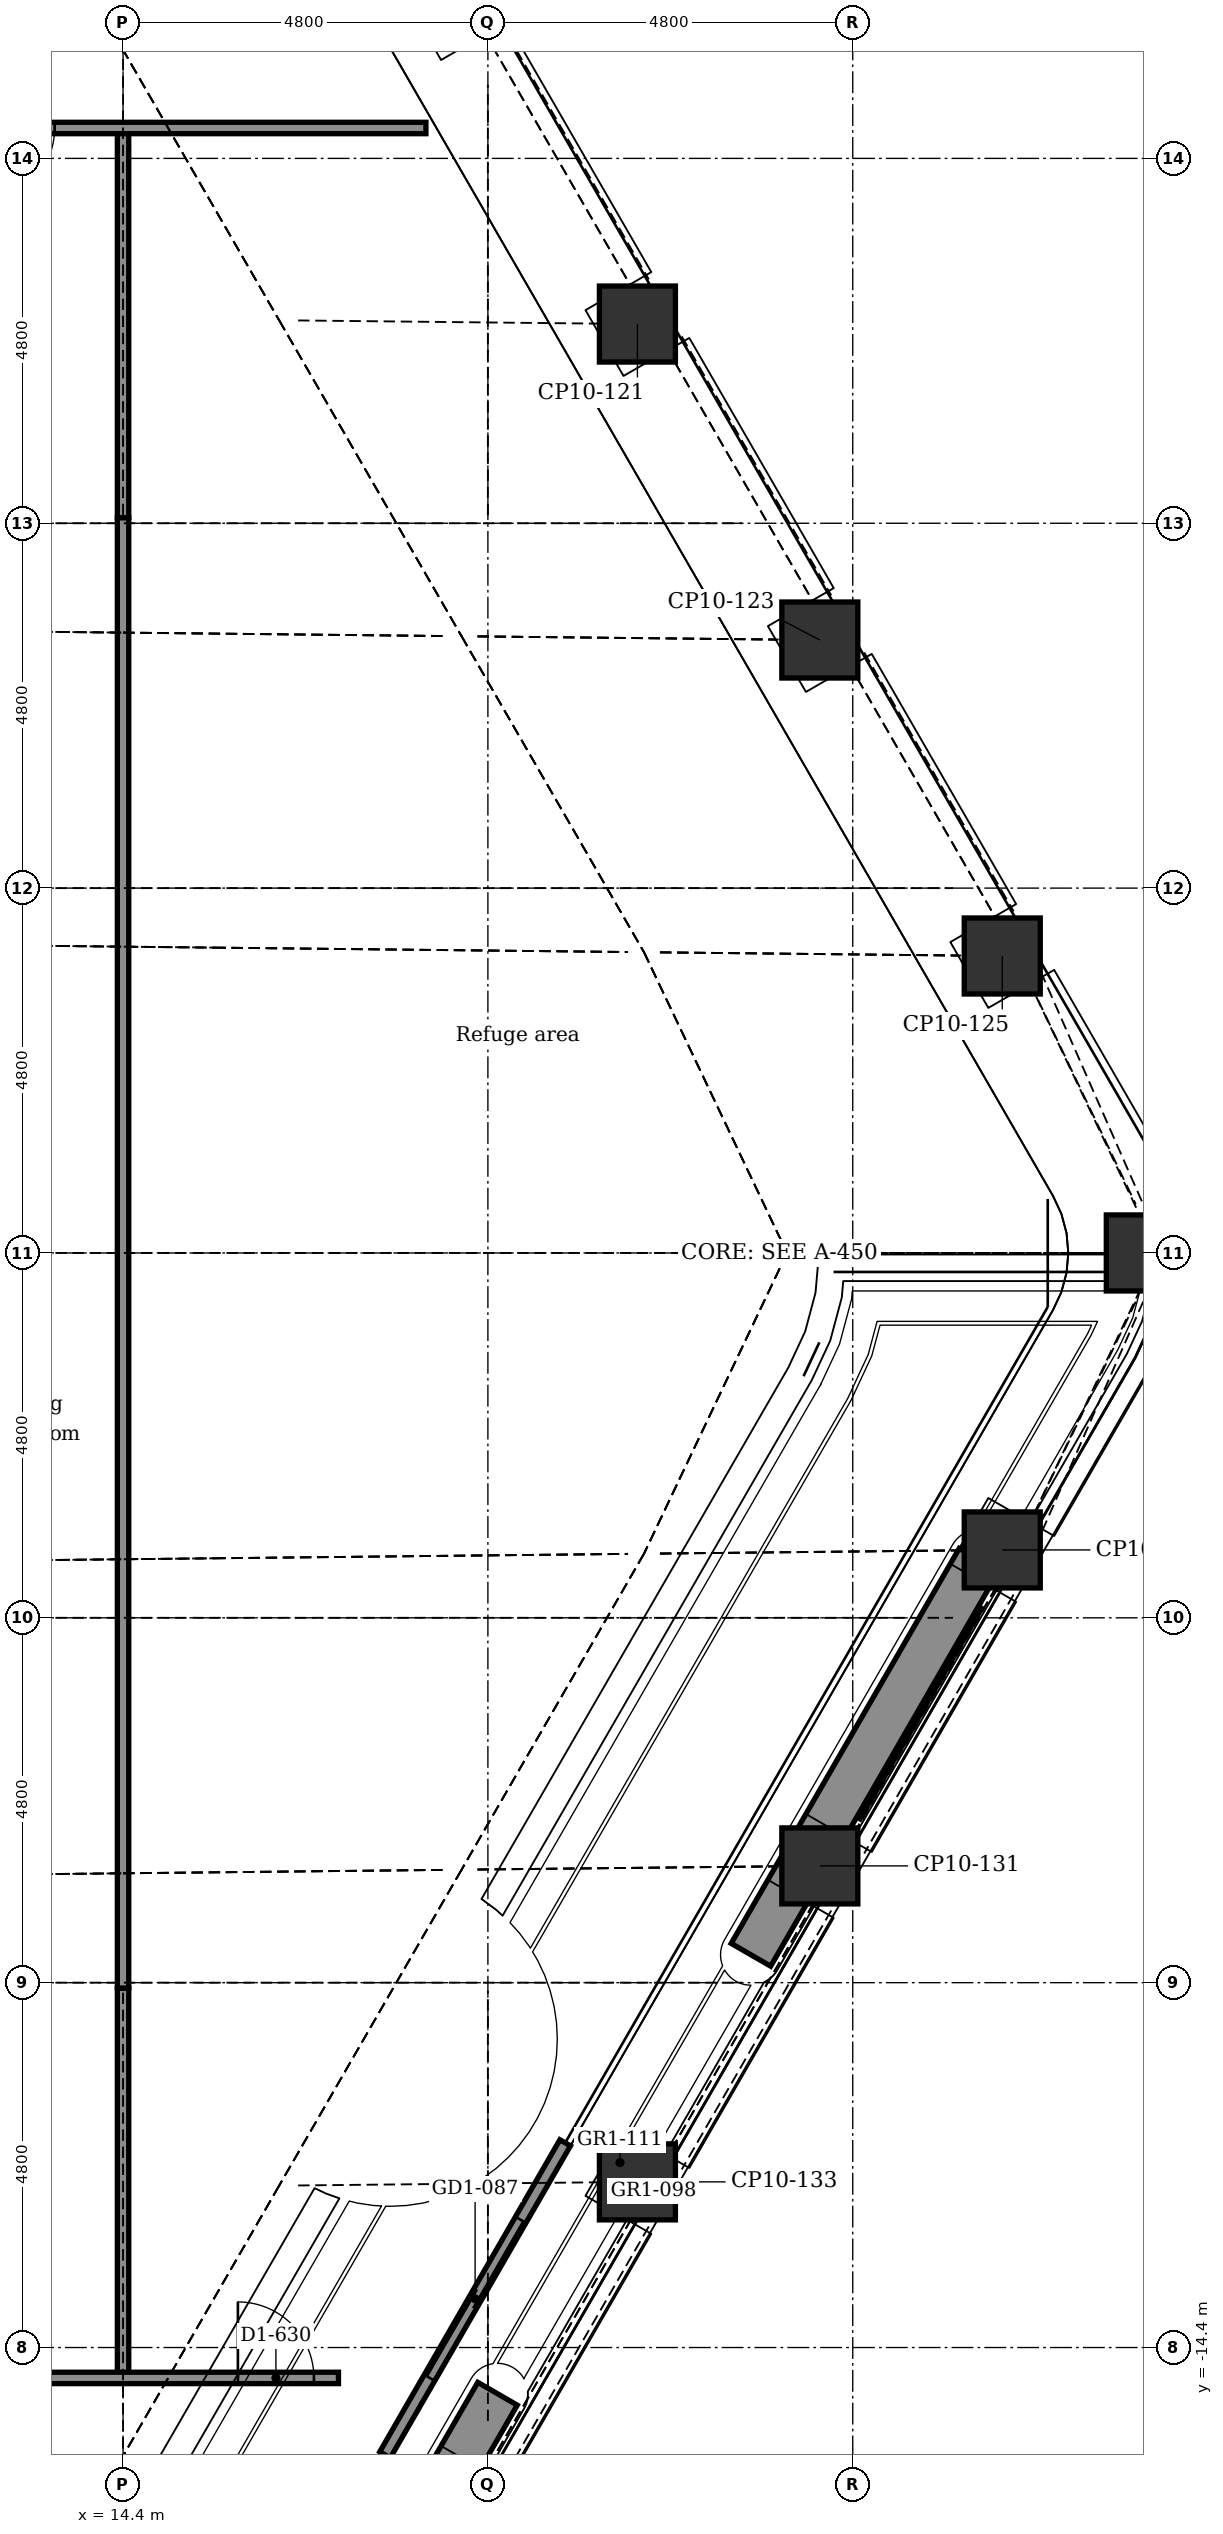
"""IFC4 building model, lengths in metres.
Left out: names, types, materials, properties, quantities, classifications, styles, units other than length and angle.
Written with IfcOpenShell. Run it as: python <this file> out.ifc"""

import sys

from ifc_helpers import new_model, si_unit, direction, frame, frame_2d, origin, origin_2d, place, context, subcontext, project, spatial, rectangle, extrude, element, fill, save


model = new_model("IFC4")
c1 = context("Model", 3, precision=1e-05, world=origin(), true_north=direction((0.0, 1.0)))
c2 = subcontext(c1, "Body", "Model", "MODEL_VIEW")
j1 = project(units=[si_unit("LENGTHUNIT", "METRE"), si_unit("PLANEANGLEUNIT", "RADIAN")], contexts=[c1])
p1 = place(None, origin())
s1 = spatial("IfcSite", under=j1, at=p1, CompositionType="ELEMENT")
p2 = place(p1, origin())
s2 = spatial("IfcBuilding", under=s1, at=p2, CompositionType="ELEMENT")
p3 = place(p2, frame((0.0, 0.0, 216.8)))
s3 = spatial("IfcBuildingStorey", under=s2, at=p3, CompositionType="ELEMENT", Elevation=216.8)
for number, where, z_axis, x_axis in (
    (1, (18.767, 16.378, -0.3), (0.0, 0.0, 1.0), (0.866, 0.5, 0.0)),
    (2, (21.167, 12.221, -0.3), (0.0, 0.0, 1.0), (0.866, 0.5, 0.0)),
    (3, (23.567, 8.064, -0.3), (0.0, 0.0, 1.0), (0.866, 0.5, 0.0)),
    (4, (25.967, 3.907, -0.3), (0.0, 0.0, 1.0), (0.866, 0.5, 0.0)),
    (5, (27.836, 0.0, -0.3), (0.0, 0.0, 1.0), (1.0, 0.0, 0.0)),
    (6, (25.967, -3.907, -0.3), (0.0, 0.0, 1.0), (0.5, 0.866, 0.0)),
    (7, (23.567, -8.064, -0.3), (0.0, 0.0, 1.0), (0.5, 0.866, 0.0)),
    (8, (21.167, -12.221, -0.3), (0.0, 0.0, 1.0), (0.5, 0.866, 0.0)),
    (9, (18.767, -16.378, -0.3), (0.0, 0.0, 1.0), (0.5, 0.866, 0.0)),
):
    element("IfcColumn", number, at=place(p3, frame(where, z_axis=z_axis, x_axis=x_axis)), inside=s3, PredefinedType="COLUMN", context=c2, shape_type="SweptSolid", body=[
        extrude(rectangle(XDim=1.0, YDim=1.0, at=origin_2d()), origin(), (0.0, 0.0, 1.0), 6.15),
    ])
p4 = place(p3, frame((20.217, -11.707, 0.0), z_axis=(0.0, 0.0, 1.0), x_axis=(-0.5000167099, -0.866015756104, 0.0)))
e10 = element("IfcWall", 10, at=p4, inside=s3, PredefinedType="PARTITIONING", context=c2, shape_type="SweptSolid", body=[
    extrude(rectangle(XDim=4.74, YDim=0.16, at=frame_2d((2.37, 0.0))), origin(), (0.0, 0.0, 1.0), 5.7),
])
p5 = place(p4, frame((1.17, 0.0, 0.0)))
e11 = element("IfcOpeningElement", 11, at=p5, cuts=e10, PredefinedType="OPENING", context=c2, shape_type="SweptSolid", body=[
    extrude(rectangle(XDim=2.4, YDim=2.4, at=frame_2d((1.2, 1.2))), frame((0.0, 0.09, 0.0), z_axis=(0.0, -1.0, 0.0), x_axis=(1.0, 0.0, 0.0)), (0.0, 0.0, 1.0), 0.18),
])
p6 = place(p3, frame((25.437, -4.525, 0.0), z_axis=(0.0, 0.0, 1.0), x_axis=(-0.499938187974, -0.866061088033, 0.0)))
e12 = element("IfcWall", 12, at=p6, inside=s3, PredefinedType="USERDEFINED", context=c2, shape_type="SweptSolid", body=[
    extrude(rectangle(XDim=3.2, YDim=0.6, at=frame_2d((1.6, 0.0))), origin(), (0.0, 0.0, 1.0), 0.7),
])
for number, where, z_axis, x_axis in (
    (13, (25.661, -4.037, 6.0), (0.0, 0.0, 1.0), (-0.5, -0.866, 0.0)),
    (14, (19.327, -15.008, 6.0), (0.0, 0.0, 1.0), (-0.5, -0.866, 0.0)),
):
    element("IfcWall", number, at=place(p3, frame(where, z_axis=z_axis, x_axis=x_axis)), inside=s3, PredefinedType="USERDEFINED", context=c2, shape_type="SweptSolid", body=[
        extrude(rectangle(XDim=6.0, YDim=0.6, at=frame_2d((3.0, 0.0))), origin(), (0.0, 0.0, 1.0), 0.7),
    ])
p7 = place(p3, frame((14.4, -9.674, 0.0), z_axis=(0.0, 0.0, 1.0), x_axis=(0.0, 1.0, 0.0)))
e15 = element("IfcWall", 15, at=p7, inside=s3, PredefinedType="PARTITIONING", context=c2, shape_type="SweptSolid", body=[
    extrude(rectangle(XDim=19.348, YDim=0.15, at=frame_2d((9.674, 0.0))), origin(), (0.0, 0.0, 1.0), 5.85),
])
for number, where, z_axis, x_axis in (
    (16, (14.4, -14.8, 0.0), (0.0, 0.0, 1.0), (0.0, 1.0, 0.0)),
    (17, (14.4, 9.674, 0.0), (0.0, 0.0, 1.0), (0.0, 1.0, 0.0)),
):
    element("IfcWall", number, at=place(p3, frame(where, z_axis=z_axis, x_axis=x_axis)), inside=s3, PredefinedType="PARTITIONING", context=c2, shape_type="SweptSolid", body=[
        extrude(rectangle(XDim=5.126, YDim=0.15, at=frame_2d((2.563, 0.0))), origin(), (0.0, 0.0, 1.0), 5.54),
    ])
p8 = place(p3, frame((5.4, -14.8, 0.0), z_axis=(0.0, 0.0, 1.0), x_axis=(1.0, 0.0, 0.0)))
e18 = element("IfcWall", 18, at=p8, inside=s3, PredefinedType="PARTITIONING", context=c2, shape_type="SweptSolid", body=[
    extrude(rectangle(XDim=11.834, YDim=0.15, at=frame_2d((5.917, 0.0))), origin(), (0.0, 0.0, 1.0), 5.7),
])
p9 = place(p8, frame((10.511, 0.0, 0.0)))
e19 = element("IfcOpeningElement", 19, at=p9, cuts=e18, PredefinedType="OPENING", context=c2, shape_type="SweptSolid", body=[
    extrude(rectangle(XDim=1.0, YDim=2.1, at=frame_2d((0.5, 1.05))), frame((0.0, 0.085, 0.0), z_axis=(0.0, -1.0, 0.0), x_axis=(1.0, 0.0, 0.0)), (0.0, 0.0, 1.0), 0.17),
])
p10 = place(p3, frame((-3.0, 14.8, 0.0), z_axis=(0.0, 0.0, 1.0), x_axis=(1.0, 0.0, 0.0)))
e20 = element("IfcWall", 20, at=p10, inside=s3, PredefinedType="PARTITIONING", context=c2, shape_type="SweptSolid", body=[
    extrude(rectangle(XDim=21.385, YDim=0.15, at=frame_2d((10.692, 0.0))), origin(), (0.0, 0.0, 1.0), 5.85),
])
p11 = place(p10, frame((1.05, 0.0, 0.0)))
e21 = element("IfcOpeningElement", 21, at=p11, cuts=e20, PredefinedType="OPENING", context=c2, shape_type="SweptSolid", body=[
    extrude(rectangle(XDim=0.9, YDim=2.1, at=frame_2d((0.45, 1.05))), frame((0.0, 0.085, 0.0), z_axis=(0.0, -1.0, 0.0), x_axis=(1.0, 0.0, 0.0)), (0.0, 0.0, 1.0), 0.17),
])
p12 = place(p10, frame((4.95, 0.0, 0.0)))
e22 = element("IfcOpeningElement", 22, at=p12, cuts=e20, PredefinedType="OPENING", context=c2, shape_type="SweptSolid", body=[
    extrude(rectangle(XDim=0.9, YDim=2.1, at=frame_2d((0.45, 1.05))), frame((0.0, 0.085, 0.0), z_axis=(0.0, -1.0, 0.0), x_axis=(1.0, 0.0, 0.0)), (0.0, 0.0, 1.0), 0.17),
])
p13 = place(p10, frame((8.685, 0.0, 0.0)))
e23 = element("IfcOpeningElement", 23, at=p13, cuts=e20, PredefinedType="OPENING", context=c2, shape_type="SweptSolid", body=[
    extrude(rectangle(XDim=1.0, YDim=2.1, at=frame_2d((0.5, 1.05))), frame((0.0, 0.085, 0.0), z_axis=(0.0, -1.0, 0.0), x_axis=(1.0, 0.0, 0.0)), (0.0, 0.0, 1.0), 0.17),
])
p14 = place(p10, frame((13.3, 0.0, 0.0)))
e24 = element("IfcOpeningElement", 24, at=p14, cuts=e20, PredefinedType="OPENING", context=c2, shape_type="SweptSolid", body=[
    extrude(rectangle(XDim=1.0, YDim=2.1, at=frame_2d((0.5, 1.05))), frame((0.0, 0.085, 0.0), z_axis=(0.0, -1.0, 0.0), x_axis=(1.0, 0.0, 0.0)), (0.0, 0.0, 1.0), 0.17),
])
p15 = place(p10, frame((15.5, 0.0, 0.0)))
e25 = element("IfcOpeningElement", 25, at=p15, cuts=e20, PredefinedType="OPENING", context=c2, shape_type="SweptSolid", body=[
    extrude(rectangle(XDim=1.0, YDim=2.1, at=frame_2d((0.5, 1.05))), frame((0.0, 0.085, 0.0), z_axis=(0.0, -1.0, 0.0), x_axis=(1.0, 0.0, 0.0)), (0.0, 0.0, 1.0), 0.17),
])
p16 = place(p5, origin())
e26 = element("IfcDoor", 26, at=p16, inside=s3, OperationType="DOUBLE_DOOR_SLIDING", PredefinedType="DOOR", context=c2, shape_type="SweptSolid", body=[
    extrude(rectangle(XDim=2.4, YDim=2.4, at=frame_2d((1.2, 1.2))), frame((0.0, 0.025, 0.0), z_axis=(0.0, -1.0, 0.0), x_axis=(1.0, 0.0, 0.0)), (0.0, 0.0, 1.0), 0.05),
])
fill(e11, e26)
p17 = place(p15, frame((1.0, 0.0, 0.0), z_axis=(0.0, 0.0, 1.0), x_axis=(-1.0, 0.0, 0.0)))
e27 = element("IfcDoor", 27, at=p17, inside=s3, OperationType="SINGLE_SWING_LEFT", PredefinedType="DOOR", context=c2, shape_type="SweptSolid", body=[
    extrude(rectangle(XDim=1.0, YDim=2.1, at=frame_2d((0.5, 1.05))), frame((0.0, 0.025, 0.0), z_axis=(0.0, -1.0, 0.0), x_axis=(1.0, 0.0, 0.0)), (0.0, 0.0, 1.0), 0.05),
])
fill(e25, e27)
p18 = place(p9, origin())
e28 = element("IfcDoor", 28, at=p18, inside=s3, OperationType="SINGLE_SWING_LEFT", PredefinedType="DOOR", context=c2, shape_type="SweptSolid", body=[
    extrude(rectangle(XDim=1.0, YDim=2.1, at=frame_2d((0.5, 1.05))), frame((0.0, 0.025, 0.0), z_axis=(0.0, -1.0, 0.0), x_axis=(1.0, 0.0, 0.0)), (0.0, 0.0, 1.0), 0.05),
])
fill(e19, e28)
save(model, sys.argv[1])
